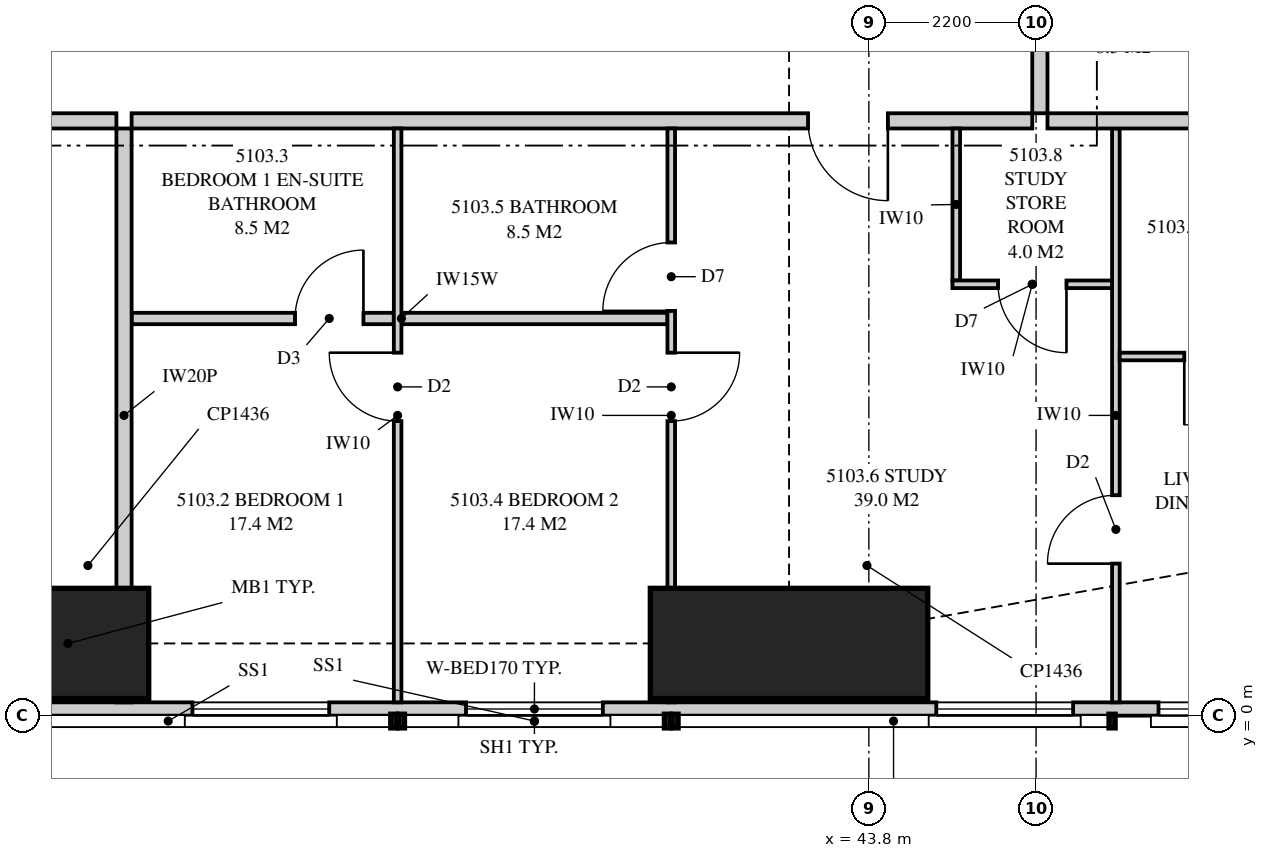
"""IFC4 building model, lengths in metres.
Left out: names, types, materials, properties, quantities, classifications, styles, units other than length and angle.
Written with IfcOpenShell. Run it as: python <this file> out.ifc"""

import sys

from ifc_helpers import new_model, si_unit, direction, frame, frame_2d, origin, origin_2d, place, context, subcontext, project, spatial, polyline, rectangle, outline, extrude, element, fill, save


model = new_model("IFC4")
c1 = context("Model", 3, precision=1e-05, world=origin(), true_north=direction((0.0, 1.0)))
c2 = subcontext(c1, "Body", "Model", "MODEL_VIEW")
j1 = project(units=[si_unit("LENGTHUNIT", "METRE"), si_unit("PLANEANGLEUNIT", "RADIAN")], contexts=[c1])
p1 = place(None, origin())
s1 = spatial("IfcSite", under=j1, at=p1, CompositionType="ELEMENT")
p2 = place(p1, origin())
s2 = spatial("IfcBuilding", under=s1, at=p2, CompositionType="ELEMENT")
p3 = place(p2, frame((0.0, 0.0, 187.85)))
s3 = spatial("IfcBuildingStorey", under=s2, at=p3, CompositionType="ELEMENT", Elevation=187.85)
for number, where, z_axis, x_axis in (
    (1, (32.5, 0.95, 0.0), (0.0, 0.0, 1.0), (0.0, 1.0, 0.0)),
    (2, (42.75, 0.95, 0.0), (0.0, 0.0, 1.0), (0.0, 1.0, 0.0)),
):
    element("IfcColumn", number, at=place(p3, frame(where, z_axis=z_axis, x_axis=x_axis)), inside=s3, PredefinedType="COLUMN", context=c2, shape_type="SweptSolid", body=[
        extrude(rectangle(XDim=1.45, YDim=3.65, at=origin_2d()), origin(), (0.0, 0.0, 1.0), 3.35),
    ])
p4 = place(p3, frame((15.051, 0.087, 0.0), z_axis=(0.0, 0.0, 1.0), x_axis=(1.0, 0.0, 0.0)))
e3 = element("IfcWall", 3, at=p4, inside=s3, PredefinedType="SOLIDWALL", context=c2, shape_type="SweptSolid", body=[
    extrude(outline(polyline([(0.0, 0.0), (34.897, 0.0), (34.897, 3.11), (27.91, 3.11), (27.91, 2.15), (27.836, 2.15), (27.836, 3.11), (27.699, 3.11), (27.699, 2.15), (7.199, 2.15), (7.199, 3.11), (7.062, 3.11), (7.062, 2.15), (6.987, 2.15), (6.987, 3.11), (0.0, 3.11), (0.0, 0.0)])), frame((0.0, 0.087, 0.0), z_axis=(0.0, -1.0, 0.0), x_axis=(1.0, 0.0, 0.0)), (0.0, 0.0, 1.0), 0.175),
])
p5 = place(p4, frame((2.84, 0.0, 0.4)))
e4 = element("IfcOpeningElement", 4, at=p5, cuts=e3, PredefinedType="OPENING", context=c2, shape_type="SweptSolid", body=[
    extrude(rectangle(XDim=2.4, YDim=1.7, at=frame_2d((1.2, 0.85))), frame((0.0, 0.097, 0.0), z_axis=(0.0, -1.0, 0.0), x_axis=(1.0, 0.0, 0.0)), (0.0, 0.0, 1.0), 0.195),
])
p6 = place(p4, frame((9.149, 0.0, 0.4)))
e5 = element("IfcOpeningElement", 5, at=p6, cuts=e3, PredefinedType="OPENING", context=c2, shape_type="SweptSolid", body=[
    extrude(rectangle(XDim=1.8, YDim=1.7, at=frame_2d((0.9, 0.85))), frame((0.0, 0.097, 0.0), z_axis=(0.0, -1.0, 0.0), x_axis=(1.0, 0.0, 0.0)), (0.0, 0.0, 1.0), 0.195),
])
p7 = place(p4, frame((13.561, 0.0, 0.0)))
e6 = element("IfcOpeningElement", 6, at=p7, cuts=e3, PredefinedType="OPENING", context=c2, shape_type="SweptSolid", body=[
    extrude(rectangle(XDim=1.8, YDim=2.1, at=frame_2d((0.9, 1.05))), frame((0.0, 0.097, 0.0), z_axis=(0.0, -1.0, 0.0), x_axis=(1.0, 0.0, 0.0)), (0.0, 0.0, 1.0), 0.195),
])
p8 = place(p4, frame((19.849, 0.0, 0.4)))
e7 = element("IfcOpeningElement", 7, at=p8, cuts=e3, PredefinedType="OPENING", context=c2, shape_type="SweptSolid", body=[
    extrude(rectangle(XDim=1.8, YDim=1.7, at=frame_2d((0.9, 0.85))), frame((0.0, 0.097, 0.0), z_axis=(0.0, -1.0, 0.0), x_axis=(1.0, 0.0, 0.0)), (0.0, 0.0, 1.0), 0.195),
])
p9 = place(p4, frame((23.449, 0.0, 0.4)))
e8 = element("IfcOpeningElement", 8, at=p9, cuts=e3, PredefinedType="OPENING", context=c2, shape_type="SweptSolid", body=[
    extrude(rectangle(XDim=1.8, YDim=1.7, at=frame_2d((0.9, 0.85))), frame((0.0, 0.097, 0.0), z_axis=(0.0, -1.0, 0.0), x_axis=(1.0, 0.0, 0.0)), (0.0, 0.0, 1.0), 0.195),
])
p10 = place(p4, frame((29.636, 0.0, 0.4)))
e9 = element("IfcOpeningElement", 9, at=p10, cuts=e3, PredefinedType="OPENING", context=c2, shape_type="SweptSolid", body=[
    extrude(rectangle(XDim=1.8, YDim=1.7, at=frame_2d((0.9, 0.85))), frame((0.0, 0.097, 0.0), z_axis=(0.0, -1.0, 0.0), x_axis=(1.0, 0.0, 0.0)), (0.0, 0.0, 1.0), 0.195),
])
p11 = place(p4, frame((32.56, 0.0, 0.4)))
e10 = element("IfcOpeningElement", 10, at=p11, cuts=e3, PredefinedType="OPENING", context=c2, shape_type="SweptSolid", body=[
    extrude(rectangle(XDim=1.8, YDim=1.7, at=frame_2d((0.9, 0.85))), frame((0.0, 0.097, 0.0), z_axis=(0.0, -1.0, 0.0), x_axis=(1.0, 0.0, 0.0)), (0.0, 0.0, 1.0), 0.195),
])
p12 = place(p3, frame((34.0, 0.175, 0.0), z_axis=(0.0, 0.0, 1.0), x_axis=(0.0, 1.0, 0.0)))
e11 = element("IfcWall", 11, at=p12, inside=s3, PredefinedType="PARTITIONING", context=c2, shape_type="SweptSolid", body=[
    extrude(outline(polyline([(0.0, 0.0), (7.55, 0.0), (7.55, 3.11), (1.685, 3.11), (1.685, 2.15), (0.0, 2.15), (0.0, 3.11), (0.0, 0.0)])), frame((0.0, 0.1, 0.0), z_axis=(0.0, -1.0, 0.0), x_axis=(1.0, 0.0, 0.0)), (0.0, 0.0, 1.0), 0.2),
])
p13 = place(p3, frame((34.1, 7.825, 0.0), z_axis=(0.0, 0.0, 1.0), x_axis=(1.0, 0.0, 0.0)))
e12 = element("IfcWall", 12, at=p13, inside=s3, PredefinedType="PARTITIONING", context=c2, shape_type="SweptSolid", body=[
    extrude(outline(polyline([(0.0, 0.0), (11.85, 0.0), (11.85, 3.11), (8.987, 3.11), (8.987, 2.541), (8.312, 2.541), (8.312, 3.11), (0.0, 3.11), (0.0, 0.0)])), frame((0.0, 0.1, 0.0), z_axis=(0.0, -1.0, 0.0), x_axis=(1.0, 0.0, 0.0)), (0.0, 0.0, 1.0), 0.2),
])
p14 = place(p13, frame((8.9, 0.0, 0.0)))
e13 = element("IfcOpeningElement", 13, at=p14, cuts=e12, PredefinedType="OPENING", context=c2, shape_type="SweptSolid", body=[
    extrude(rectangle(XDim=1.05, YDim=2.2, at=frame_2d((0.525, 1.1))), frame((0.0, 0.11, 0.0), z_axis=(0.0, -1.0, 0.0), x_axis=(1.0, 0.0, 0.0)), (0.0, 0.0, 1.0), 0.22),
])
p15 = place(p3, frame((37.6, 0.175, 0.0), z_axis=(0.0, 0.0, 1.0), x_axis=(0.0, 1.0, 0.0)))
e14 = element("IfcWall", 14, at=p15, inside=s3, PredefinedType="PARTITIONING", context=c2, shape_type="SweptSolid", body=[
    extrude(outline(polyline([(0.0, 0.0), (7.55, 0.0), (7.55, 3.11), (1.635, 3.11), (1.635, 2.15), (0.0, 2.15), (0.0, 3.11), (0.0, 0.0)])), frame((0.0, 0.05, 0.0), z_axis=(0.0, -1.0, 0.0), x_axis=(1.0, 0.0, 0.0)), (0.0, 0.0, 1.0), 0.1),
])
p16 = place(p15, frame((3.7, 0.0, 0.0)))
e15 = element("IfcOpeningElement", 15, at=p16, cuts=e14, PredefinedType="OPENING", context=c2, shape_type="SweptSolid", body=[
    extrude(rectangle(XDim=0.9, YDim=2.1, at=frame_2d((0.45, 1.05))), frame((0.0, 0.06, 0.0), z_axis=(0.0, -1.0, 0.0), x_axis=(1.0, 0.0, 0.0)), (0.0, 0.0, 1.0), 0.12),
])
p17 = place(p3, frame((41.2, 0.175, 0.0), z_axis=(0.0, 0.0, 1.0), x_axis=(0.0, 1.0, 0.0)))
e16 = element("IfcWall", 16, at=p17, inside=s3, PredefinedType="PARTITIONING", context=c2, shape_type="SweptSolid", body=[
    extrude(outline(polyline([(0.0, 0.0), (7.55, 0.0), (7.55, 3.11), (1.635, 3.11), (1.635, 2.15), (0.0, 2.15), (0.0, 3.11), (0.0, 0.0)])), frame((0.0, 0.05, 0.0), z_axis=(0.0, -1.0, 0.0), x_axis=(1.0, 0.0, 0.0)), (0.0, 0.0, 1.0), 0.1),
])
p18 = place(p17, frame((3.7, 0.0, 0.0)))
e17 = element("IfcOpeningElement", 17, at=p18, cuts=e16, PredefinedType="OPENING", context=c2, shape_type="SweptSolid", body=[
    extrude(rectangle(XDim=0.9, YDim=2.1, at=frame_2d((0.45, 1.05))), frame((0.0, 0.06, 0.0), z_axis=(0.0, -1.0, 0.0), x_axis=(1.0, 0.0, 0.0)), (0.0, 0.0, 1.0), 0.12),
])
p19 = place(p17, frame((5.15, 0.0, 0.0)))
e18 = element("IfcOpeningElement", 18, at=p19, cuts=e16, PredefinedType="OPENING", context=c2, shape_type="SweptSolid", body=[
    extrude(rectangle(XDim=0.9, YDim=2.1, at=frame_2d((0.45, 1.05))), frame((0.0, 0.06, 0.0), z_axis=(0.0, -1.0, 0.0), x_axis=(1.0, 0.0, 0.0)), (0.0, 0.0, 1.0), 0.12),
])
p20 = place(p3, frame((34.1, 5.225, 0.0), z_axis=(0.0, 0.0, 1.0), x_axis=(1.0, 0.0, 0.0)))
e19 = element("IfcWall", 19, at=p20, inside=s3, PredefinedType="PLUMBINGWALL", context=c2, shape_type="SweptSolid", body=[
    extrude(rectangle(XDim=3.45, YDim=0.15, at=frame_2d((1.725, 0.0))), origin(), (0.0, 0.0, 1.0), 3.11),
])
p21 = place(p20, frame((2.15, 0.0, 0.0)))
e20 = element("IfcOpeningElement", 20, at=p21, cuts=e19, PredefinedType="OPENING", context=c2, shape_type="SweptSolid", body=[
    extrude(rectangle(XDim=0.9, YDim=2.1, at=frame_2d((0.45, 1.05))), frame((0.0, 0.085, 0.0), z_axis=(0.0, -1.0, 0.0), x_axis=(1.0, 0.0, 0.0)), (0.0, 0.0, 1.0), 0.17),
])
p22 = place(p3, frame((37.65, 5.225, 0.0), z_axis=(0.0, 0.0, 1.0), x_axis=(1.0, 0.0, 0.0)))
e21 = element("IfcWall", 21, at=p22, inside=s3, PredefinedType="PLUMBINGWALL", context=c2, shape_type="SweptSolid", body=[
    extrude(rectangle(XDim=3.5, YDim=0.15, at=frame_2d((1.75, 0.0))), origin(), (0.0, 0.0, 1.0), 3.11),
])
p23 = place(p3, frame((47.05, 0.175, 0.0), z_axis=(0.0, 0.0, 1.0), x_axis=(0.0, 1.0, 0.0)))
e22 = element("IfcWall", 22, at=p23, inside=s3, PredefinedType="PARTITIONING", context=c2, shape_type="SweptSolid", body=[
    extrude(outline(polyline([(0.0, 0.0), (7.55, 0.0), (7.55, 3.11), (2.409, 3.11), (2.409, 2.15), (0.663, 2.15), (0.663, 3.11), (0.0, 3.11), (0.0, 0.0)])), frame((0.0, 0.05, 0.0), z_axis=(0.0, -1.0, 0.0), x_axis=(1.0, 0.0, 0.0)), (0.0, 0.0, 1.0), 0.1),
])
p24 = place(p23, frame((1.825, 0.0, 0.0)))
e23 = element("IfcOpeningElement", 23, at=p24, cuts=e22, PredefinedType="OPENING", context=c2, shape_type="SweptSolid", body=[
    extrude(rectangle(XDim=0.9, YDim=2.1, at=frame_2d((0.45, 1.05))), frame((0.0, 0.06, 0.0), z_axis=(0.0, -1.0, 0.0), x_axis=(1.0, 0.0, 0.0)), (0.0, 0.0, 1.0), 0.12),
])
p25 = place(p3, frame((47.1, 4.725, 0.0), z_axis=(0.0, 0.0, 1.0), x_axis=(1.0, 0.0, 0.0)))
e24 = element("IfcWall", 24, at=p25, inside=s3, PredefinedType="PARTITIONING", context=c2, shape_type="SweptSolid", body=[
    extrude(rectangle(XDim=2.6, YDim=0.1, at=frame_2d((1.3, 0.0))), origin(), (0.0, 0.0, 1.0), 3.11),
])
p26 = place(p25, frame((0.85, 0.0, 0.0)))
e25 = element("IfcOpeningElement", 25, at=p26, cuts=e24, PredefinedType="OPENING", context=c2, shape_type="SweptSolid", body=[
    extrude(rectangle(XDim=0.9, YDim=2.1, at=frame_2d((0.45, 1.05))), frame((0.0, 0.06, 0.0), z_axis=(0.0, -1.0, 0.0), x_axis=(1.0, 0.0, 0.0)), (0.0, 0.0, 1.0), 0.12),
])
p27 = place(p3, frame((46.15, 7.825, 0.0), z_axis=(0.0, 0.0, 1.0), x_axis=(1.0, 0.0, 0.0)))
e26 = element("IfcWall", 26, at=p27, inside=s3, PredefinedType="PARTITIONING", context=c2, shape_type="SweptSolid", body=[
    extrude(outline(polyline([(0.0, 0.0), (6.85, 0.0), (6.85, 3.11), (6.138, 3.11), (6.138, 2.15), (4.303, 2.15), (4.303, 3.11), (0.0, 3.11), (0.0, 0.0)])), frame((0.0, 0.1, 0.0), z_axis=(0.0, -1.0, 0.0), x_axis=(1.0, 0.0, 0.0)), (0.0, 0.0, 1.0), 0.2),
])
p28 = place(p3, frame((46.05, 7.925, 0.0), z_axis=(0.0, 0.0, 1.0), x_axis=(0.0, 1.0, 0.0)))
e27 = element("IfcWall", 27, at=p28, inside=s3, PredefinedType="PARTITIONING", context=c2, shape_type="SweptSolid", body=[
    extrude(outline(polyline([(0.0, 0.0), (13.775, 0.0), (13.775, 3.11), (5.412, 3.11), (5.412, 2.541), (4.738, 2.541), (4.738, 3.11), (0.0, 3.11), (0.0, 0.0)])), frame((0.0, 0.1, 0.0), z_axis=(0.0, -1.0, 0.0), x_axis=(1.0, 0.0, 0.0)), (0.0, 0.0, 1.0), 0.2),
])
p29 = place(p28, frame((6.387, 0.0, 0.0)))
e28 = element("IfcOpeningElement", 28, at=p29, cuts=e27, PredefinedType="OPENING", context=c2, shape_type="SweptSolid", body=[
    extrude(rectangle(XDim=1.05, YDim=2.2, at=frame_2d((0.525, 1.1))), frame((0.0, 0.11, 0.0), z_axis=(0.0, -1.0, 0.0), x_axis=(1.0, 0.0, 0.0)), (0.0, 0.0, 1.0), 0.22),
])
p30 = place(p3, frame((30.05, 7.825, 0.0), z_axis=(0.0, 0.0, 1.0), x_axis=(1.0, 0.0, 0.0)))
e29 = element("IfcWall", 29, at=p30, inside=s3, PredefinedType="PARTITIONING", context=c2, shape_type="SweptSolid", body=[
    extrude(outline(polyline([(0.0, 0.0), (3.85, 0.0), (3.85, 3.11), (2.787, 3.11), (2.787, 2.541), (2.113, 2.541), (2.113, 3.11), (0.0, 3.11), (0.0, 0.0)])), frame((0.0, 0.1, 0.0), z_axis=(0.0, -1.0, 0.0), x_axis=(1.0, 0.0, 0.0)), (0.0, 0.0, 1.0), 0.2),
])
p31 = place(p3, frame((47.0, 5.675, 0.0), z_axis=(0.0, 0.0, 1.0), x_axis=(-1.0, 0.0, 0.0)))
e30 = element("IfcWall", 30, at=p31, inside=s3, PredefinedType="PARTITIONING", context=c2, shape_type="SweptSolid", body=[
    extrude(rectangle(XDim=2.1, YDim=0.1, at=frame_2d((1.05, 0.0))), origin(), (0.0, 0.0, 1.0), 3.11),
])
p32 = place(p31, frame((0.6, 0.0, 0.0)))
e31 = element("IfcOpeningElement", 31, at=p32, cuts=e30, PredefinedType="OPENING", context=c2, shape_type="SweptSolid", body=[
    extrude(rectangle(XDim=0.9, YDim=2.1, at=frame_2d((0.45, 1.05))), frame((0.0, 0.06, 0.0), z_axis=(0.0, -1.0, 0.0), x_axis=(1.0, 0.0, 0.0)), (0.0, 0.0, 1.0), 0.12),
])
p33 = place(p3, frame((44.95, 7.725, 0.0), z_axis=(0.0, 0.0, 1.0), x_axis=(0.0, -1.0, 0.0)))
e32 = element("IfcWall", 32, at=p33, inside=s3, PredefinedType="PARTITIONING", context=c2, shape_type="SweptSolid", body=[
    extrude(rectangle(XDim=2.0, YDim=0.1, at=frame_2d((1.0, 0.0))), origin(), (0.0, 0.0, 1.0), 3.11),
])
p34 = place(p8, origin())
e33 = element("IfcWindow", 33, at=p34, inside=s3, PartitioningType="SINGLE_PANEL", PredefinedType="WINDOW", context=c2, shape_type="SweptSolid", body=[
    extrude(rectangle(XDim=1.8, YDim=1.7, at=frame_2d((0.9, 0.85))), frame((0.0, 0.03, 0.0), z_axis=(0.0, -1.0, 0.0), x_axis=(1.0, 0.0, 0.0)), (0.0, 0.0, 1.0), 0.06),
])
fill(e7, e33)
p35 = place(p9, origin())
e34 = element("IfcWindow", 34, at=p35, inside=s3, PartitioningType="SINGLE_PANEL", PredefinedType="WINDOW", context=c2, shape_type="SweptSolid", body=[
    extrude(rectangle(XDim=1.8, YDim=1.7, at=frame_2d((0.9, 0.85))), frame((0.0, 0.03, 0.0), z_axis=(0.0, -1.0, 0.0), x_axis=(1.0, 0.0, 0.0)), (0.0, 0.0, 1.0), 0.06),
])
fill(e8, e34)
p36 = place(p10, origin())
e35 = element("IfcWindow", 35, at=p36, inside=s3, PartitioningType="SINGLE_PANEL", PredefinedType="WINDOW", context=c2, shape_type="SweptSolid", body=[
    extrude(rectangle(XDim=1.8, YDim=1.7, at=frame_2d((0.9, 0.85))), frame((0.0, 0.03, 0.0), z_axis=(0.0, -1.0, 0.0), x_axis=(1.0, 0.0, 0.0)), (0.0, 0.0, 1.0), 0.06),
])
fill(e9, e35)
p37 = place(p11, origin())
e36 = element("IfcWindow", 36, at=p37, inside=s3, PartitioningType="SINGLE_PANEL", PredefinedType="WINDOW", context=c2, shape_type="SweptSolid", body=[
    extrude(rectangle(XDim=1.8, YDim=1.7, at=frame_2d((0.9, 0.85))), frame((0.0, 0.03, 0.0), z_axis=(0.0, -1.0, 0.0), x_axis=(1.0, 0.0, 0.0)), (0.0, 0.0, 1.0), 0.06),
])
fill(e10, e36)
p38 = place(p14, frame((1.05, 0.0, 0.0), z_axis=(0.0, 0.0, 1.0), x_axis=(-1.0, 0.0, 0.0)))
e37 = element("IfcDoor", 37, at=p38, inside=s3, OperationType="SINGLE_SWING_LEFT", PredefinedType="DOOR", context=c2, shape_type="SweptSolid", body=[
    extrude(rectangle(XDim=1.05, YDim=2.2, at=frame_2d((0.525, 1.1))), frame((0.0, 0.025, 0.0), z_axis=(0.0, -1.0, 0.0), x_axis=(1.0, 0.0, 0.0)), (0.0, 0.0, 1.0), 0.05),
])
fill(e13, e37)
p39 = place(p16, origin())
e38 = element("IfcDoor", 38, at=p39, inside=s3, OperationType="SINGLE_SWING_RIGHT", PredefinedType="DOOR", context=c2, shape_type="SweptSolid", body=[
    extrude(rectangle(XDim=0.9, YDim=2.1, at=frame_2d((0.45, 1.05))), frame((0.0, 0.025, 0.0), z_axis=(0.0, -1.0, 0.0), x_axis=(1.0, 0.0, 0.0)), (0.0, 0.0, 1.0), 0.05),
])
fill(e15, e38)
p40 = place(p21, origin())
e39 = element("IfcDoor", 39, at=p40, inside=s3, OperationType="SINGLE_SWING_RIGHT", PredefinedType="DOOR", context=c2, shape_type="SweptSolid", body=[
    extrude(rectangle(XDim=0.9, YDim=2.1, at=frame_2d((0.45, 1.05))), frame((0.0, 0.025, 0.0), z_axis=(0.0, -1.0, 0.0), x_axis=(1.0, 0.0, 0.0)), (0.0, 0.0, 1.0), 0.05),
])
fill(e20, e39)
p41 = place(p18, frame((0.9, 0.0, 0.0), z_axis=(0.0, 0.0, 1.0), x_axis=(-1.0, 0.0, 0.0)))
e40 = element("IfcDoor", 40, at=p41, inside=s3, OperationType="SINGLE_SWING_LEFT", PredefinedType="DOOR", context=c2, shape_type="SweptSolid", body=[
    extrude(rectangle(XDim=0.9, YDim=2.1, at=frame_2d((0.45, 1.05))), frame((0.0, 0.025, 0.0), z_axis=(0.0, -1.0, 0.0), x_axis=(1.0, 0.0, 0.0)), (0.0, 0.0, 1.0), 0.05),
])
fill(e17, e40)
p42 = place(p19, origin())
e41 = element("IfcDoor", 41, at=p42, inside=s3, OperationType="SINGLE_SWING_LEFT", PredefinedType="DOOR", context=c2, shape_type="SweptSolid", body=[
    extrude(rectangle(XDim=0.9, YDim=2.1, at=frame_2d((0.45, 1.05))), frame((0.0, 0.025, 0.0), z_axis=(0.0, -1.0, 0.0), x_axis=(1.0, 0.0, 0.0)), (0.0, 0.0, 1.0), 0.05),
])
fill(e18, e41)
p43 = place(p24, origin())
e42 = element("IfcDoor", 42, at=p43, inside=s3, OperationType="SINGLE_SWING_LEFT", PredefinedType="DOOR", context=c2, shape_type="SweptSolid", body=[
    extrude(rectangle(XDim=0.9, YDim=2.1, at=frame_2d((0.45, 1.05))), frame((0.0, 0.025, 0.0), z_axis=(0.0, -1.0, 0.0), x_axis=(1.0, 0.0, 0.0)), (0.0, 0.0, 1.0), 0.05),
])
fill(e23, e42)
p44 = place(p26, frame((0.9, 0.0, 0.0), z_axis=(0.0, 0.0, 1.0), x_axis=(-1.0, 0.0, 0.0)))
e43 = element("IfcDoor", 43, at=p44, inside=s3, OperationType="SINGLE_SWING_RIGHT", PredefinedType="DOOR", context=c2, shape_type="SweptSolid", body=[
    extrude(rectangle(XDim=0.9, YDim=2.1, at=frame_2d((0.45, 1.05))), frame((0.0, 0.025, 0.0), z_axis=(0.0, -1.0, 0.0), x_axis=(1.0, 0.0, 0.0)), (0.0, 0.0, 1.0), 0.05),
])
fill(e25, e43)
p45 = place(p32, origin())
e44 = element("IfcDoor", 44, at=p45, inside=s3, OperationType="SINGLE_SWING_LEFT", PredefinedType="DOOR", context=c2, shape_type="SweptSolid", body=[
    extrude(rectangle(XDim=0.9, YDim=2.1, at=frame_2d((0.45, 1.05))), frame((0.0, 0.025, 0.0), z_axis=(0.0, -1.0, 0.0), x_axis=(1.0, 0.0, 0.0)), (0.0, 0.0, 1.0), 0.05),
])
fill(e31, e44)
save(model, sys.argv[1])
